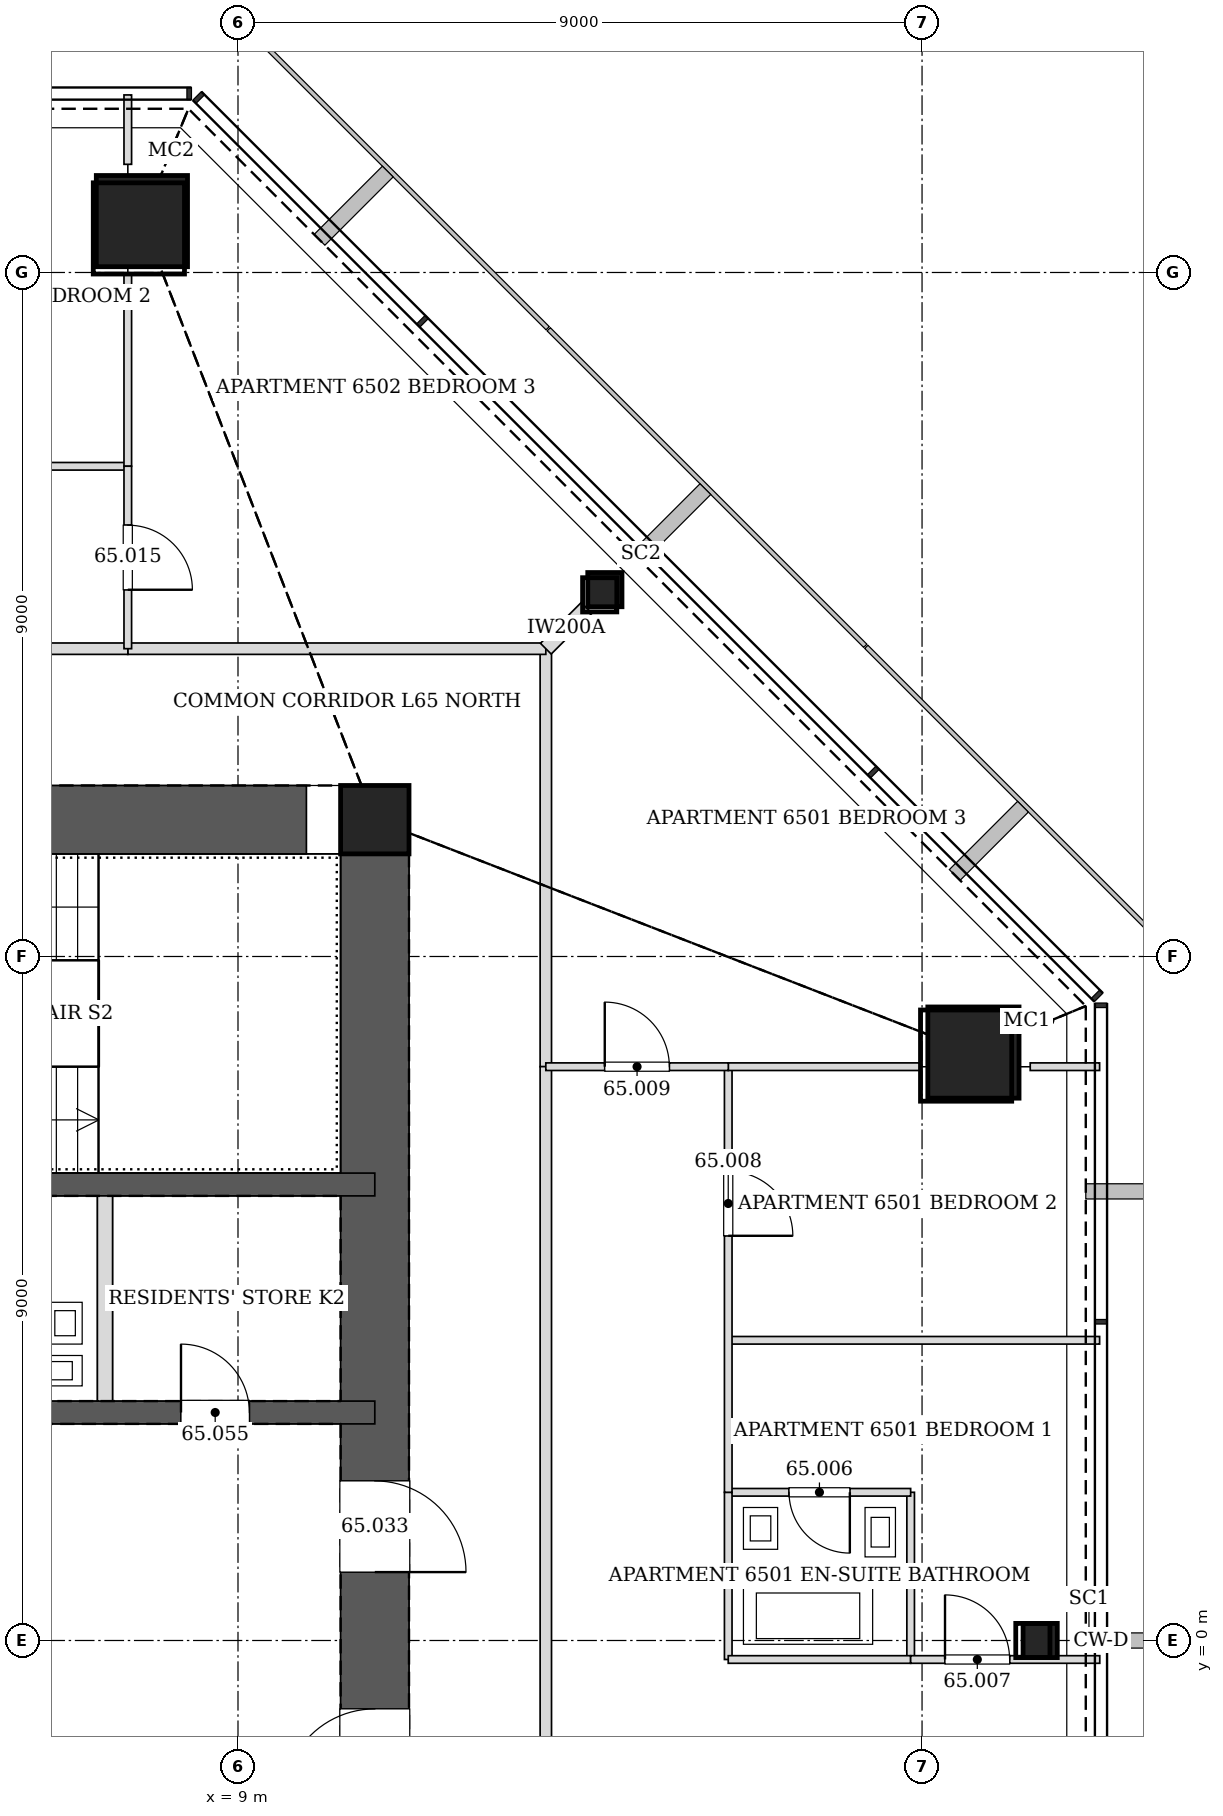
"""IFC4 building model, lengths in metres.
Left out: names, types, materials, properties, quantities, classifications, styles, units other than length and angle.
Written with IfcOpenShell. Run it as: python <this file> out.ifc"""

import sys

from ifc_helpers import new_model, si_unit, direction, frame, frame_2d, origin, origin_2d, place, context, subcontext, project, spatial, rectangle, hollow_rectangle, extrude, element, fill, save


model = new_model("IFC4")
c1 = context("Model", 3, precision=1e-05, world=origin(), true_north=direction((0.0, 1.0)))
c2 = subcontext(c1, "Body", "Model", "MODEL_VIEW")
j1 = project(units=[si_unit("LENGTHUNIT", "METRE"), si_unit("PLANEANGLEUNIT", "RADIAN")], contexts=[c1])
p1 = place(None, origin())
s1 = spatial("IfcSite", under=j1, at=p1, CompositionType="ELEMENT")
p2 = place(p1, origin())
s2 = spatial("IfcBuilding", under=s1, at=p2, CompositionType="ELEMENT")
p3 = place(p2, frame((0.0, 0.0, 270.8)))
s3 = spatial("IfcBuildingStorey", under=s2, at=p3, CompositionType="ELEMENT", Elevation=270.8)
for number, where, z_axis, x_axis in (
    (1, (18.676, 7.736, 0.0), (-0.028, -0.012, 1.0), (0.382, -0.924, 0.0)),
    (2, (7.736, 18.676, 0.0), (-0.012, -0.028, 1.0), (0.924, -0.382, 0.0)),
):
    element("IfcColumn", number, at=place(p3, frame(where, z_axis=z_axis, x_axis=x_axis)), inside=s3, PredefinedType="COLUMN", context=c2, shape_type="SweptSolid", body=[
        extrude(hollow_rectangle(XDim=1.2, YDim=1.2, WallThickness=0.055, at=origin_2d()), origin(), (0.0, 0.0, 1.0), 3.402),
    ])
for number, where, z_axis, x_axis in (
    (3, (19.554, 0.0, 0.0), (-0.028, 0.0, 1.0), (0.0, -1.0, 0.0)),
    (4, (13.827, 13.827, 0.0), (-0.02, -0.02, 1.0), (0.707, -0.707, 0.0)),
):
    element("IfcColumn", number, at=place(p3, frame(where, z_axis=z_axis, x_axis=x_axis)), inside=s3, PredefinedType="COLUMN", context=c2, shape_type="SweptSolid", body=[
        extrude(hollow_rectangle(XDim=0.45, YDim=0.45, WallThickness=0.02, at=origin_2d()), origin(), (0.0, 0.0, 1.0), 3.401),
    ])
p4 = place(p3, frame((10.8, 10.8, 0.0), z_axis=(0.0, 0.0, 1.0), x_axis=(1.0, 0.0, 0.0)))
e5 = element("IfcColumn", 5, at=p4, inside=s3, PredefinedType="COLUMN", context=c2, shape_type="SweptSolid", body=[
    extrude(hollow_rectangle(XDim=0.9, YDim=0.9, WallThickness=0.04, at=origin_2d()), origin(), (0.0, 0.0, 1.0), 3.4),
])
p5 = place(p3, frame((10.8, -10.8, 0.0), z_axis=(0.0, 0.0, 1.0), x_axis=(0.0, 1.0, 0.0)))
e6 = element("IfcWall", 6, at=p5, inside=s3, PredefinedType="SOLIDWALL", context=c2, shape_type="SweptSolid", body=[
    extrude(rectangle(XDim=21.6, YDim=0.9, at=frame_2d((10.8, 0.0))), origin(), (0.0, 0.0, 1.0), 3.4),
])
p6 = place(p5, frame((11.7, 0.0, 0.0)))
e7 = element("IfcOpeningElement", 7, at=p6, cuts=e6, PredefinedType="OPENING", context=c2, shape_type="SweptSolid", body=[
    extrude(rectangle(XDim=1.2, YDim=2.1, at=frame_2d((0.6, 1.05))), frame((0.0, 0.46, 0.0), z_axis=(0.0, -1.0, 0.0), x_axis=(1.0, 0.0, 0.0)), (0.0, 0.0, 1.0), 0.92),
])
p7 = place(p5, frame((8.7, 0.0, 0.0)))
e8 = element("IfcOpeningElement", 8, at=p7, cuts=e6, PredefinedType="OPENING", context=c2, shape_type="SweptSolid", body=[
    extrude(rectangle(XDim=1.2, YDim=2.1, at=frame_2d((0.6, 1.05))), frame((0.0, 0.46, 0.0), z_axis=(0.0, -1.0, 0.0), x_axis=(1.0, 0.0, 0.0)), (0.0, 0.0, 1.0), 0.92),
])
p8 = place(p3, frame((10.8, 10.8, 0.0), z_axis=(0.0, 0.0, 1.0), x_axis=(-1.0, 0.0, 0.0)))
e9 = element("IfcWall", 9, at=p8, inside=s3, PredefinedType="SOLIDWALL", context=c2, shape_type="SweptSolid", body=[
    extrude(rectangle(XDim=21.6, YDim=0.9, at=frame_2d((10.8, 0.0))), origin(), (0.0, 0.0, 1.0), 3.4),
])
p9 = place(p8, frame((10.05, 0.0, 0.0)))
e10 = element("IfcOpeningElement", 10, at=p9, cuts=e9, PredefinedType="OPENING", context=c2, shape_type="SweptSolid", body=[
    extrude(rectangle(XDim=1.5, YDim=2.1, at=frame_2d((0.75, 1.05))), frame((0.0, 0.46, 0.0), z_axis=(0.0, -1.0, 0.0), x_axis=(1.0, 0.0, 0.0)), (0.0, 0.0, 1.0), 0.92),
])
p10 = place(p3, frame((-10.8, 3.0, 0.0), z_axis=(0.0, 0.0, 1.0), x_axis=(1.0, 0.0, 0.0)))
e11 = element("IfcWall", 11, at=p10, inside=s3, PredefinedType="SOLIDWALL", context=c2, shape_type="SweptSolid", body=[
    extrude(rectangle(XDim=21.6, YDim=0.3, at=frame_2d((10.8, 0.0))), origin(), (0.0, 0.0, 1.0), 3.4),
])
p11 = place(p10, frame((1.65, 0.0, 0.0)))
e12 = element("IfcOpeningElement", 12, at=p11, cuts=e11, PredefinedType="OPENING", context=c2, shape_type="SweptSolid", body=[
    extrude(rectangle(XDim=0.9, YDim=2.1, at=frame_2d((0.45, 1.05))), frame((0.0, 0.16, 0.0), z_axis=(0.0, -1.0, 0.0), x_axis=(1.0, 0.0, 0.0)), (0.0, 0.0, 1.0), 0.32),
])
p12 = place(p10, frame((13.25, 0.0, 0.0)))
e13 = element("IfcOpeningElement", 13, at=p12, cuts=e11, PredefinedType="OPENING", context=c2, shape_type="SweptSolid", body=[
    extrude(rectangle(XDim=0.9, YDim=2.1, at=frame_2d((0.45, 1.05))), frame((0.0, 0.16, 0.0), z_axis=(0.0, -1.0, 0.0), x_axis=(1.0, 0.0, 0.0)), (0.0, 0.0, 1.0), 0.32),
])
p13 = place(p10, frame((16.15, 0.0, 0.0)))
e14 = element("IfcOpeningElement", 14, at=p13, cuts=e11, PredefinedType="OPENING", context=c2, shape_type="SweptSolid", body=[
    extrude(rectangle(XDim=0.9, YDim=2.1, at=frame_2d((0.45, 1.05))), frame((0.0, 0.16, 0.0), z_axis=(0.0, -1.0, 0.0), x_axis=(1.0, 0.0, 0.0)), (0.0, 0.0, 1.0), 0.32),
])
p14 = place(p10, frame((4.55, 0.0, 0.0)))
e15 = element("IfcOpeningElement", 15, at=p14, cuts=e11, PredefinedType="OPENING", context=c2, shape_type="SweptSolid", body=[
    extrude(rectangle(XDim=0.9, YDim=2.1, at=frame_2d((0.45, 1.05))), frame((0.0, 0.16, 0.0), z_axis=(0.0, -1.0, 0.0), x_axis=(1.0, 0.0, 0.0)), (0.0, 0.0, 1.0), 0.32),
])
p15 = place(p10, frame((7.45, 0.0, 0.0)))
e16 = element("IfcOpeningElement", 16, at=p15, cuts=e11, PredefinedType="OPENING", context=c2, shape_type="SweptSolid", body=[
    extrude(rectangle(XDim=0.9, YDim=2.1, at=frame_2d((0.45, 1.05))), frame((0.0, 0.16, 0.0), z_axis=(0.0, -1.0, 0.0), x_axis=(1.0, 0.0, 0.0)), (0.0, 0.0, 1.0), 0.32),
])
p16 = place(p10, frame((19.05, 0.0, 0.0)))
e17 = element("IfcOpeningElement", 17, at=p16, cuts=e11, PredefinedType="OPENING", context=c2, shape_type="SweptSolid", body=[
    extrude(rectangle(XDim=0.9, YDim=2.1, at=frame_2d((0.45, 1.05))), frame((0.0, 0.16, 0.0), z_axis=(0.0, -1.0, 0.0), x_axis=(1.0, 0.0, 0.0)), (0.0, 0.0, 1.0), 0.32),
])
p17 = place(p3, frame((-10.8, 6.0, 0.0), z_axis=(0.0, 0.0, 1.0), x_axis=(1.0, 0.0, 0.0)))
e18 = element("IfcWall", 18, at=p17, inside=s3, PredefinedType="SOLIDWALL", context=c2, shape_type="SweptSolid", body=[
    extrude(rectangle(XDim=21.6, YDim=0.3, at=frame_2d((10.8, 0.0))), origin(), (0.0, 0.0, 1.0), 3.4),
])
p18 = place(p17, frame((10.25, 0.0, 0.0)))
e19 = element("IfcOpeningElement", 19, at=p18, cuts=e18, PredefinedType="OPENING", context=c2, shape_type="SweptSolid", body=[
    extrude(rectangle(XDim=1.1, YDim=2.1, at=frame_2d((0.55, 1.05))), frame((0.0, 0.16, 0.0), z_axis=(0.0, -1.0, 0.0), x_axis=(1.0, 0.0, 0.0)), (0.0, 0.0, 1.0), 0.32),
])
p19 = place(p3, frame((13.05, 7.549, 0.0), z_axis=(0.0, 0.0, 1.0), x_axis=(0.0, 1.0, 0.0)))
e20 = element("IfcWall", 20, at=p19, inside=s3, PredefinedType="PARTITIONING", context=c2, shape_type="SweptSolid", body=[
    extrude(rectangle(XDim=5.501, YDim=0.15, at=frame_2d((2.75, 0.0))), origin(), (0.0, 0.0, 1.0), 2.349),
])
p20 = place(p3, frame((13.05, -2.051, 0.0), z_axis=(0.0, 0.0, 1.0), x_axis=(0.0, 1.0, 0.0)))
e21 = element("IfcWall", 21, at=p20, inside=s3, PredefinedType="PARTITIONING", context=c2, shape_type="SweptSolid", body=[
    extrude(rectangle(XDim=9.602, YDim=0.15, at=frame_2d((4.801, 0.0))), origin(), (0.0, 0.0, 1.0), 2.344),
])
p21 = place(p3, frame((13.05, 13.05, 0.0), z_axis=(0.0, 0.0, 1.0), x_axis=(-1.0, 0.0, 0.0)))
e22 = element("IfcWall", 22, at=p21, inside=s3, PredefinedType="PARTITIONING", context=c2, shape_type="SweptSolid", body=[
    extrude(rectangle(XDim=5.501, YDim=0.15, at=frame_2d((2.75, 0.0))), origin(), (0.0, 0.0, 1.0), 2.349),
])
p22 = place(p3, frame((7.551, 13.05, 0.0), z_axis=(0.0, 0.0, 1.0), x_axis=(-1.0, 0.0, 0.0)))
e23 = element("IfcWall", 23, at=p22, inside=s3, PredefinedType="PARTITIONING", context=c2, shape_type="SweptSolid", body=[
    extrude(rectangle(XDim=8.751, YDim=0.15, at=frame_2d((4.375, 0.0))), origin(), (0.0, 0.0, 1.0), 2.344),
])
p23 = place(p3, frame((17.85, -0.25, 0.0), z_axis=(0.0, 0.0, 1.0), x_axis=(0.0, 1.0, 0.0)))
e24 = element("IfcWall", 24, at=p23, inside=s3, PredefinedType="PARTITIONING", context=c2, shape_type="SweptSolid", body=[
    extrude(rectangle(XDim=2.2, YDim=0.1, at=frame_2d((1.1, 0.0))), origin(), (0.0, 0.0, 1.0), 2.344),
])
p24 = place(p3, frame((17.85, 1.95, 0.0), z_axis=(0.0, 0.0, 1.0), x_axis=(-1.0, 0.0, 0.0)))
e25 = element("IfcWall", 25, at=p24, inside=s3, PredefinedType="PARTITIONING", context=c2, shape_type="SweptSolid", body=[
    extrude(rectangle(XDim=2.4, YDim=0.1, at=frame_2d((1.2, 0.0))), origin(), (0.0, 0.0, 1.0), 2.591),
])
p25 = place(p24, frame((0.8, 0.0, 0.0)))
e26 = element("IfcOpeningElement", 26, at=p25, cuts=e25, PredefinedType="OPENING", context=c2, shape_type="SweptSolid", body=[
    extrude(rectangle(XDim=0.8, YDim=2.1, at=frame_2d((0.4, 1.05))), frame((0.0, 0.06, 0.0), z_axis=(0.0, -1.0, 0.0), x_axis=(1.0, 0.0, 0.0)), (0.0, 0.0, 1.0), 0.12),
])
p26 = place(p3, frame((15.45, 1.95, 0.0), z_axis=(0.0, 0.0, 1.0), x_axis=(0.0, -1.0, 0.0)))
e27 = element("IfcWall", 27, at=p26, inside=s3, PredefinedType="PARTITIONING", context=c2, shape_type="SweptSolid", body=[
    extrude(rectangle(XDim=2.2, YDim=0.1, at=frame_2d((1.1, 0.0))), origin(), (0.0, 0.0, 1.0), 2.344),
])
p27 = place(p3, frame((15.45, -0.25, 0.0), z_axis=(0.0, 0.0, 1.0), x_axis=(1.0, 0.0, 0.0)))
e28 = element("IfcWall", 28, at=p27, inside=s3, PredefinedType="PARTITIONING", context=c2, shape_type="SweptSolid", body=[
    extrude(rectangle(XDim=2.4, YDim=0.1, at=frame_2d((1.2, 0.0))), origin(), (0.0, 0.0, 1.0), 2.591),
])
p28 = place(p3, frame((20.336, 3.95, 0.0), z_axis=(0.0, 0.0, 1.0), x_axis=(-1.0, 0.0, 0.0)))
e29 = element("IfcWall", 29, at=p28, inside=s3, PredefinedType="PARTITIONING", context=c2, shape_type="SweptSolid", body=[
    extrude(rectangle(XDim=4.886, YDim=0.1, at=frame_2d((2.443, 0.0))), origin(), (0.0, 0.0, 1.0), 2.591),
])
p29 = place(p3, frame((15.45, 1.95, 0.0), z_axis=(0.0, 0.0, 1.0), x_axis=(0.0, 1.0, 0.0)))
e30 = element("IfcWall", 30, at=p29, inside=s3, PredefinedType="PARTITIONING", context=c2, shape_type="SweptSolid", body=[
    extrude(rectangle(XDim=5.6, YDim=0.1, at=frame_2d((2.8, 0.0))), origin(), (0.0, 0.0, 1.0), 3.2),
])
p30 = place(p29, frame((3.375, 0.0, 0.0)))
e31 = element("IfcOpeningElement", 31, at=p30, cuts=e30, PredefinedType="OPENING", context=c2, shape_type="SweptSolid", body=[
    extrude(rectangle(XDim=0.85, YDim=2.1, at=frame_2d((0.425, 1.05))), frame((0.0, 0.06, 0.0), z_axis=(0.0, -1.0, 0.0), x_axis=(1.0, 0.0, 0.0)), (0.0, 0.0, 1.0), 0.12),
])
p31 = place(p3, frame((17.85, -0.25, 0.0), z_axis=(0.0, 0.0, 1.0), x_axis=(1.0, 0.0, 0.0)))
e32 = element("IfcWall", 32, at=p31, inside=s3, PredefinedType="PARTITIONING", context=c2, shape_type="SweptSolid", body=[
    extrude(rectangle(XDim=2.488, YDim=0.1, at=frame_2d((1.244, 0.0))), origin(), (0.0, 0.0, 1.0), 2.74),
])
p32 = place(p31, frame((0.452, 0.0, 0.0)))
e33 = element("IfcOpeningElement", 33, at=p32, cuts=e32, PredefinedType="OPENING", context=c2, shape_type="SweptSolid", body=[
    extrude(rectangle(XDim=0.85, YDim=2.1, at=frame_2d((0.425, 1.05))), frame((0.0, 0.06, 0.0), z_axis=(0.0, -1.0, 0.0), x_axis=(1.0, 0.0, 0.0)), (0.0, 0.0, 1.0), 0.12),
])
p33 = place(p3, frame((20.336, 7.55, 0.0), z_axis=(0.0, 0.0, 1.0), x_axis=(-1.0, 0.0, 0.0)))
e34 = element("IfcWall", 34, at=p33, inside=s3, PredefinedType="PARTITIONING", context=c2, shape_type="SweptSolid", body=[
    extrude(rectangle(XDim=0.913, YDim=0.1, at=frame_2d((0.457, 0.0))), origin(), (0.0, 0.0, 1.0), 3.2),
])
p34 = place(p3, frame((17.97, 7.55, 0.0), z_axis=(0.0, 0.0, 1.0), x_axis=(-1.0, 0.0, 0.0)))
e35 = element("IfcWall", 35, at=p34, inside=s3, PredefinedType="PARTITIONING", context=c2, shape_type="SweptSolid", body=[
    extrude(rectangle(XDim=2.52, YDim=0.1, at=frame_2d((1.26, 0.0))), origin(), (0.0, 0.0, 1.0), 2.591),
])
p35 = place(p3, frame((13.05, 7.55, 0.0), z_axis=(0.0, 0.0, 1.0), x_axis=(1.0, 0.0, 0.0)))
e36 = element("IfcWall", 36, at=p35, inside=s3, PredefinedType="PARTITIONING", context=c2, shape_type="SweptSolid", body=[
    extrude(rectangle(XDim=2.401, YDim=0.1, at=frame_2d((1.2, 0.0))), origin(), (0.0, 0.0, 1.0), 2.591),
])
p36 = place(p35, frame((0.775, 0.0, 0.0)))
e37 = element("IfcOpeningElement", 37, at=p36, cuts=e36, PredefinedType="OPENING", context=c2, shape_type="SweptSolid", body=[
    extrude(rectangle(XDim=0.85, YDim=2.1, at=frame_2d((0.425, 1.05))), frame((0.0, 0.06, 0.0), z_axis=(0.0, -1.0, 0.0), x_axis=(1.0, 0.0, 0.0)), (0.0, 0.0, 1.0), 0.12),
])
p37 = place(p3, frame((13.586, 13.586, 0.0), z_axis=(0.0, 0.0, 1.0), x_axis=(-0.707106781187, -0.707106781187, 0.0)))
e38 = element("IfcWall", 38, at=p37, inside=s3, PredefinedType="PARTITIONING", context=c2, shape_type="SweptSolid", body=[
    extrude(rectangle(XDim=0.758, YDim=0.2, at=frame_2d((0.379, 0.0))), origin(), (0.0, 0.0, 1.0), 2.591),
])
p38 = place(p3, frame((1.95, 15.45, 0.0), z_axis=(0.0, 0.0, 1.0), x_axis=(1.0, 0.0, 0.0)))
e39 = element("IfcWall", 39, at=p38, inside=s3, PredefinedType="PARTITIONING", context=c2, shape_type="SweptSolid", body=[
    extrude(rectangle(XDim=5.6, YDim=0.1, at=frame_2d((2.8, 0.0))), origin(), (0.0, 0.0, 1.0), 3.2),
])
p39 = place(p38, frame((3.375, 0.0, 0.0)))
e40 = element("IfcOpeningElement", 40, at=p39, cuts=e39, PredefinedType="OPENING", context=c2, shape_type="SweptSolid", body=[
    extrude(rectangle(XDim=0.85, YDim=2.1, at=frame_2d((0.425, 1.05))), frame((0.0, 0.06, 0.0), z_axis=(0.0, -1.0, 0.0), x_axis=(1.0, 0.0, 0.0)), (0.0, 0.0, 1.0), 0.12),
])
p40 = place(p3, frame((7.55, 15.45, 0.0), z_axis=(0.0, 0.0, 1.0), x_axis=(0.0, 1.0, 0.0)))
e41 = element("IfcWall", 41, at=p40, inside=s3, PredefinedType="PARTITIONING", context=c2, shape_type="SweptSolid", body=[
    extrude(rectangle(XDim=2.52, YDim=0.1, at=frame_2d((1.26, 0.0))), origin(), (0.0, 0.0, 1.0), 2.591),
])
p41 = place(p3, frame((7.55, 19.423, 0.0), z_axis=(0.0, 0.0, 1.0), x_axis=(0.0, 1.0, 0.0)))
e42 = element("IfcWall", 42, at=p41, inside=s3, PredefinedType="PARTITIONING", context=c2, shape_type="SweptSolid", body=[
    extrude(rectangle(XDim=0.913, YDim=0.1, at=frame_2d((0.457, 0.0))), origin(), (0.0, 0.0, 1.0), 3.2),
])
p42 = place(p3, frame((7.55, 15.451, 0.0), z_axis=(0.0, 0.0, 1.0), x_axis=(0.0, -1.0, 0.0)))
e43 = element("IfcWall", 43, at=p42, inside=s3, PredefinedType="PARTITIONING", context=c2, shape_type="SweptSolid", body=[
    extrude(rectangle(XDim=2.401, YDim=0.1, at=frame_2d((1.2, 0.0))), origin(), (0.0, 0.0, 1.0), 2.591),
])
p43 = place(p42, frame((0.775, 0.0, 0.0)))
e44 = element("IfcOpeningElement", 44, at=p43, cuts=e43, PredefinedType="OPENING", context=c2, shape_type="SweptSolid", body=[
    extrude(rectangle(XDim=0.85, YDim=2.1, at=frame_2d((0.425, 1.05))), frame((0.0, 0.06, 0.0), z_axis=(0.0, -1.0, 0.0), x_axis=(1.0, 0.0, 0.0)), (0.0, 0.0, 1.0), 0.12),
])
p44 = place(p3, frame((7.25, 3.15, 0.0), z_axis=(0.0, 0.0, 1.0), x_axis=(0.0, 1.0, 0.0)))
e45 = element("IfcWall", 45, at=p44, inside=s3, PredefinedType="PARTITIONING", context=c2, shape_type="SweptSolid", body=[
    extrude(rectangle(XDim=2.7, YDim=0.2, at=frame_2d((1.35, 0.0))), origin(), (0.0, 0.0, 1.0), 3.2),
])
p45 = place(p25, origin())
e46 = element("IfcDoor", 46, at=p45, inside=s3, OperationType="SINGLE_SWING_LEFT", PredefinedType="DOOR", context=c2, shape_type="SweptSolid", body=[
    extrude(rectangle(XDim=0.8, YDim=2.1, at=frame_2d((0.4, 1.05))), frame((0.0, 0.025, 0.0), z_axis=(0.0, -1.0, 0.0), x_axis=(1.0, 0.0, 0.0)), (0.0, 0.0, 1.0), 0.05),
])
fill(e26, e46)
p46 = place(p32, origin())
e47 = element("IfcDoor", 47, at=p46, inside=s3, OperationType="SINGLE_SWING_LEFT", PredefinedType="DOOR", context=c2, shape_type="SweptSolid", body=[
    extrude(rectangle(XDim=0.85, YDim=2.1, at=frame_2d((0.425, 1.05))), frame((0.0, 0.025, 0.0), z_axis=(0.0, -1.0, 0.0), x_axis=(1.0, 0.0, 0.0)), (0.0, 0.0, 1.0), 0.05),
])
fill(e33, e47)
p47 = place(p30, frame((0.85, 0.0, 0.0), z_axis=(0.0, 0.0, 1.0), x_axis=(-1.0, 0.0, 0.0)))
e48 = element("IfcDoor", 48, at=p47, inside=s3, OperationType="SINGLE_SWING_RIGHT", PredefinedType="DOOR", context=c2, shape_type="SweptSolid", body=[
    extrude(rectangle(XDim=0.85, YDim=2.1, at=frame_2d((0.425, 1.05))), frame((0.0, 0.025, 0.0), z_axis=(0.0, -1.0, 0.0), x_axis=(1.0, 0.0, 0.0)), (0.0, 0.0, 1.0), 0.05),
])
fill(e31, e48)
p48 = place(p36, origin())
e49 = element("IfcDoor", 49, at=p48, inside=s3, OperationType="SINGLE_SWING_LEFT", PredefinedType="DOOR", context=c2, shape_type="SweptSolid", body=[
    extrude(rectangle(XDim=0.85, YDim=2.1, at=frame_2d((0.425, 1.05))), frame((0.0, 0.025, 0.0), z_axis=(0.0, -1.0, 0.0), x_axis=(1.0, 0.0, 0.0)), (0.0, 0.0, 1.0), 0.05),
])
fill(e37, e49)
p49 = place(p43, origin())
e50 = element("IfcDoor", 50, at=p49, inside=s3, OperationType="SINGLE_SWING_RIGHT", PredefinedType="DOOR", context=c2, shape_type="SweptSolid", body=[
    extrude(rectangle(XDim=0.85, YDim=2.1, at=frame_2d((0.425, 1.05))), frame((0.0, 0.025, 0.0), z_axis=(0.0, -1.0, 0.0), x_axis=(1.0, 0.0, 0.0)), (0.0, 0.0, 1.0), 0.05),
])
fill(e44, e50)
p50 = place(p6, frame((1.2, 0.0, 0.0), z_axis=(0.0, 0.0, 1.0), x_axis=(-1.0, 0.0, 0.0)))
e51 = element("IfcDoor", 51, at=p50, inside=s3, OperationType="SINGLE_SWING_RIGHT", PredefinedType="DOOR", context=c2, shape_type="SweptSolid", body=[
    extrude(rectangle(XDim=1.2, YDim=2.1, at=frame_2d((0.6, 1.05))), frame((0.0, 0.025, 0.0), z_axis=(0.0, -1.0, 0.0), x_axis=(1.0, 0.0, 0.0)), (0.0, 0.0, 1.0), 0.05),
])
fill(e7, e51)
p51 = place(p7, origin())
e52 = element("IfcDoor", 52, at=p51, inside=s3, OperationType="SINGLE_SWING_LEFT", PredefinedType="DOOR", context=c2, shape_type="SweptSolid", body=[
    extrude(rectangle(XDim=1.2, YDim=2.1, at=frame_2d((0.6, 1.05))), frame((0.0, 0.025, 0.0), z_axis=(0.0, -1.0, 0.0), x_axis=(1.0, 0.0, 0.0)), (0.0, 0.0, 1.0), 0.05),
])
fill(e8, e52)
p52 = place(p16, origin())
e53 = element("IfcDoor", 53, at=p52, inside=s3, OperationType="SINGLE_SWING_LEFT", PredefinedType="DOOR", context=c2, shape_type="SweptSolid", body=[
    extrude(rectangle(XDim=0.9, YDim=2.1, at=frame_2d((0.45, 1.05))), frame((0.0, 0.025, 0.0), z_axis=(0.0, -1.0, 0.0), x_axis=(1.0, 0.0, 0.0)), (0.0, 0.0, 1.0), 0.05),
])
fill(e17, e53)
save(model, sys.argv[1])
